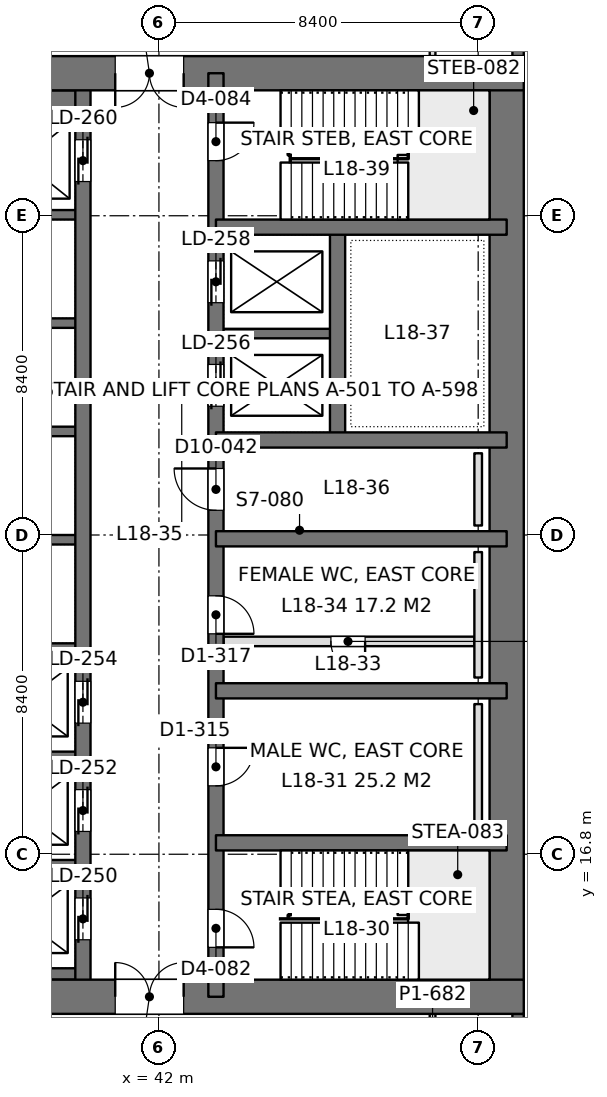
"""IFC4 building model, lengths in metres.
Left out: names, types, materials, properties, quantities, classifications, styles, units other than length and angle.
Written with IfcOpenShell. Run it as: python <this file> out.ifc"""

import sys

from ifc_helpers import new_model, si_unit, direction, frame, frame_2d, origin, place, context, subcontext, project, spatial, rectangle, extrude, element, fill, save


model = new_model("IFC4")
c1 = context("Model", 3, precision=1e-05, world=origin(), true_north=direction((0.0, 1.0)))
c2 = subcontext(c1, "Body", "Model", "MODEL_VIEW")
j1 = project(units=[si_unit("LENGTHUNIT", "METRE"), si_unit("PLANEANGLEUNIT", "RADIAN")], contexts=[c1])
p1 = place(None, origin())
s1 = spatial("IfcSite", under=j1, at=p1, CompositionType="ELEMENT")
p2 = place(p1, origin())
s2 = spatial("IfcBuilding", under=s1, at=p2, CompositionType="ELEMENT")
p3 = place(p2, frame((0.0, 0.0, 81.9)))
s3 = spatial("IfcBuildingStorey", under=s2, at=p3, CompositionType="ELEMENT", Elevation=81.9)
p4 = place(p3, frame((33.6, 13.05, 0.0), z_axis=(0.0, 0.0, 1.0), x_axis=(1.0, 0.0, 0.0)))
e1 = element("IfcWall", 1, at=p4, inside=s3, PredefinedType="SHEAR", context=c2, shape_type="SweptSolid", body=[
    extrude(rectangle(XDim=18.0, YDim=0.9, at=frame_2d((9.0, 0.0))), origin(), (0.0, 0.0, 1.0), 4.5),
])
p5 = place(p4, frame((7.25, 0.0, 0.0)))
e2 = element("IfcOpeningElement", 2, at=p5, cuts=e1, PredefinedType="OPENING", context=c2, shape_type="SweptSolid", body=[
    extrude(rectangle(XDim=1.8, YDim=2.4, at=frame_2d((0.9, 1.2))), frame((0.0, 0.46, 0.0), z_axis=(0.0, -1.0, 0.0), x_axis=(1.0, 0.0, 0.0)), (0.0, 0.0, 1.0), 0.92),
])
p6 = place(p3, frame((33.6, 37.35, 0.0), z_axis=(0.0, 0.0, 1.0), x_axis=(1.0, 0.0, 0.0)))
e3 = element("IfcWall", 3, at=p6, inside=s3, PredefinedType="SHEAR", context=c2, shape_type="SweptSolid", body=[
    extrude(rectangle(XDim=18.0, YDim=0.9, at=frame_2d((9.0, 0.0))), origin(), (0.0, 0.0, 1.0), 4.5),
])
p7 = place(p6, frame((7.25, 0.0, 0.0)))
e4 = element("IfcOpeningElement", 4, at=p7, cuts=e3, PredefinedType="OPENING", context=c2, shape_type="SweptSolid", body=[
    extrude(rectangle(XDim=1.8, YDim=2.4, at=frame_2d((0.9, 1.2))), frame((0.0, 0.46, 0.0), z_axis=(0.0, -1.0, 0.0), x_axis=(1.0, 0.0, 0.0)), (0.0, 0.0, 1.0), 0.92),
])
p8 = place(p3, frame((51.15, 13.05, 0.0), z_axis=(0.0, 0.0, 1.0), x_axis=(0.0, 1.0, 0.0)))
e5 = element("IfcWall", 5, at=p8, inside=s3, PredefinedType="SHEAR", context=c2, shape_type="SweptSolid", body=[
    extrude(rectangle(XDim=24.3, YDim=0.9, at=frame_2d((12.15, 0.0))), origin(), (0.0, 0.0, 1.0), 4.5),
])
p9 = place(p3, frame((43.5, 13.05, 0.0), z_axis=(0.0, 0.0, 1.0), x_axis=(0.0, 1.0, 0.0)))
e6 = element("IfcWall", 6, at=p9, inside=s3, PredefinedType="SHEAR", context=c2, shape_type="SweptSolid", body=[
    extrude(rectangle(XDim=24.3, YDim=0.4, at=frame_2d((12.15, 0.0))), origin(), (0.0, 0.0, 1.0), 4.5),
])
p10 = place(p9, frame((1.3, 0.0, 0.0)))
e7 = element("IfcOpeningElement", 7, at=p10, cuts=e6, PredefinedType="OPENING", context=c2, shape_type="SweptSolid", body=[
    extrude(rectangle(XDim=1.0, YDim=2.2, at=frame_2d((0.5, 1.1))), frame((0.0, 0.21, 0.0), z_axis=(0.0, -1.0, 0.0), x_axis=(1.0, 0.0, 0.0)), (0.0, 0.0, 1.0), 0.42),
])
p11 = place(p9, frame((22.0, 0.0, 0.0)))
e8 = element("IfcOpeningElement", 8, at=p11, cuts=e6, PredefinedType="OPENING", context=c2, shape_type="SweptSolid", body=[
    extrude(rectangle(XDim=1.0, YDim=2.2, at=frame_2d((0.5, 1.1))), frame((0.0, 0.21, 0.0), z_axis=(0.0, -1.0, 0.0), x_axis=(1.0, 0.0, 0.0)), (0.0, 0.0, 1.0), 0.42),
])
p12 = place(p9, frame((5.55, 0.0, 0.0)))
e9 = element("IfcOpeningElement", 9, at=p12, cuts=e6, PredefinedType="OPENING", context=c2, shape_type="SweptSolid", body=[
    extrude(rectangle(XDim=1.0, YDim=2.2, at=frame_2d((0.5, 1.1))), frame((0.0, 0.21, 0.0), z_axis=(0.0, -1.0, 0.0), x_axis=(1.0, 0.0, 0.0)), (0.0, 0.0, 1.0), 0.42),
])
p13 = place(p9, frame((9.55, 0.0, 0.0)))
e10 = element("IfcOpeningElement", 10, at=p13, cuts=e6, PredefinedType="OPENING", context=c2, shape_type="SweptSolid", body=[
    extrude(rectangle(XDim=1.0, YDim=2.2, at=frame_2d((0.5, 1.1))), frame((0.0, 0.21, 0.0), z_axis=(0.0, -1.0, 0.0), x_axis=(1.0, 0.0, 0.0)), (0.0, 0.0, 1.0), 0.42),
])
p14 = place(p9, frame((12.8, 0.0, 0.0)))
e11 = element("IfcOpeningElement", 11, at=p14, cuts=e6, PredefinedType="OPENING", context=c2, shape_type="SweptSolid", body=[
    extrude(rectangle(XDim=1.1, YDim=2.2, at=frame_2d((0.55, 1.1))), frame((0.0, 0.21, 0.0), z_axis=(0.0, -1.0, 0.0), x_axis=(1.0, 0.0, 0.0)), (0.0, 0.0, 1.0), 0.42),
])
p15 = place(p9, frame((15.538, 0.0, 0.0)))
e12 = element("IfcOpeningElement", 12, at=p15, cuts=e6, PredefinedType="OPENING", context=c2, shape_type="SweptSolid", body=[
    extrude(rectangle(XDim=1.1, YDim=2.2, at=frame_2d((0.55, 1.1))), frame((0.0, 0.21, 0.0), z_axis=(0.0, -1.0, 0.0), x_axis=(1.0, 0.0, 0.0)), (0.0, 0.0, 1.0), 0.42),
])
p16 = place(p9, frame((18.262, 0.0, 0.0)))
e13 = element("IfcOpeningElement", 13, at=p16, cuts=e6, PredefinedType="OPENING", context=c2, shape_type="SweptSolid", body=[
    extrude(rectangle(XDim=1.1, YDim=2.2, at=frame_2d((0.55, 1.1))), frame((0.0, 0.21, 0.0), z_axis=(0.0, -1.0, 0.0), x_axis=(1.0, 0.0, 0.0)), (0.0, 0.0, 1.0), 0.42),
])
p17 = place(p3, frame((40.0, 13.05, 0.0), z_axis=(0.0, 0.0, 1.0), x_axis=(0.0, 1.0, 0.0)))
e14 = element("IfcWall", 14, at=p17, inside=s3, PredefinedType="SHEAR", context=c2, shape_type="SweptSolid", body=[
    extrude(rectangle(XDim=24.3, YDim=0.4, at=frame_2d((12.15, 0.0))), origin(), (0.0, 0.0, 1.0), 4.5),
])
p18 = place(p17, frame((1.5, 0.0, 0.0)))
e15 = element("IfcOpeningElement", 15, at=p18, cuts=e14, PredefinedType="OPENING", context=c2, shape_type="SweptSolid", body=[
    extrude(rectangle(XDim=1.1, YDim=2.2, at=frame_2d((0.55, 1.1))), frame((0.0, 0.21, 0.0), z_axis=(0.0, -1.0, 0.0), x_axis=(1.0, 0.0, 0.0)), (0.0, 0.0, 1.0), 0.42),
])
p19 = place(p17, frame((4.35, 0.0, 0.0)))
e16 = element("IfcOpeningElement", 16, at=p19, cuts=e14, PredefinedType="OPENING", context=c2, shape_type="SweptSolid", body=[
    extrude(rectangle(XDim=1.1, YDim=2.2, at=frame_2d((0.55, 1.1))), frame((0.0, 0.21, 0.0), z_axis=(0.0, -1.0, 0.0), x_axis=(1.0, 0.0, 0.0)), (0.0, 0.0, 1.0), 0.42),
])
p20 = place(p17, frame((7.2, 0.0, 0.0)))
e17 = element("IfcOpeningElement", 17, at=p20, cuts=e14, PredefinedType="OPENING", context=c2, shape_type="SweptSolid", body=[
    extrude(rectangle(XDim=1.1, YDim=2.2, at=frame_2d((0.55, 1.1))), frame((0.0, 0.21, 0.0), z_axis=(0.0, -1.0, 0.0), x_axis=(1.0, 0.0, 0.0)), (0.0, 0.0, 1.0), 0.42),
])
p21 = place(p17, frame((21.45, 0.0, 0.0)))
e18 = element("IfcOpeningElement", 18, at=p21, cuts=e14, PredefinedType="OPENING", context=c2, shape_type="SweptSolid", body=[
    extrude(rectangle(XDim=1.1, YDim=2.2, at=frame_2d((0.55, 1.1))), frame((0.0, 0.21, 0.0), z_axis=(0.0, -1.0, 0.0), x_axis=(1.0, 0.0, 0.0)), (0.0, 0.0, 1.0), 0.42),
])
for number, where, z_axis, x_axis in (
    (19, (51.15, 17.1, 0.0), (0.0, 0.0, 1.0), (-1.0, 0.0, 0.0)),
    (20, (51.15, 21.1, 0.0), (0.0, 0.0, 1.0), (-1.0, 0.0, 0.0)),
    (21, (51.15, 25.1, 0.0), (0.0, 0.0, 1.0), (-1.0, 0.0, 0.0)),
    (22, (51.15, 27.7, 0.0), (0.0, 0.0, 1.0), (-1.0, 0.0, 0.0)),
    (23, (51.15, 33.3, 0.0), (0.0, 0.0, 1.0), (-1.0, 0.0, 0.0)),
):
    element("IfcWall", number, at=place(p3, frame(where, z_axis=z_axis, x_axis=x_axis)), inside=s3, PredefinedType="SHEAR", context=c2, shape_type="SweptSolid", body=[
        extrude(rectangle(XDim=7.65, YDim=0.4, at=frame_2d((3.825, 0.0))), origin(), (0.0, 0.0, 1.0), 4.5),
    ])
p22 = place(p3, frame((46.7, 27.7, 0.0), z_axis=(0.0, 0.0, 1.0), x_axis=(0.0, 1.0, 0.0)))
e24 = element("IfcWall", 24, at=p22, inside=s3, PredefinedType="SHEAR", context=c2, shape_type="SweptSolid", body=[
    extrude(rectangle(XDim=5.6, YDim=0.4, at=frame_2d((2.8, 0.0))), origin(), (0.0, 0.0, 1.0), 4.5),
])
p23 = place(p3, frame((46.7, 30.5, 0.0), z_axis=(0.0, 0.0, 1.0), x_axis=(-1.0, 0.0, 0.0)))
e25 = element("IfcWall", 25, at=p23, inside=s3, PredefinedType="SHEAR", context=c2, shape_type="SweptSolid", body=[
    extrude(rectangle(XDim=3.2, YDim=0.25, at=frame_2d((1.6, 0.0))), origin(), (0.0, 0.0, 1.0), 4.5),
])
p24 = place(p3, frame((40.0, 13.65, 0.0), z_axis=(0.0, 0.0, 1.0), x_axis=(-1.0, 0.0, 0.0)))
e26 = element("IfcWall", 26, at=p24, inside=s3, PredefinedType="SHEAR", context=c2, shape_type="SweptSolid", body=[
    extrude(rectangle(XDim=3.2, YDim=0.3, at=frame_2d((1.6, 0.0))), origin(), (0.0, 0.0, 1.0), 4.5),
])
for number, where, z_axis, x_axis in (
    (27, (40.0, 16.525, 0.0), (0.0, 0.0, 1.0), (-1.0, 0.0, 0.0)),
    (28, (40.0, 19.375, 0.0), (0.0, 0.0, 1.0), (-1.0, 0.0, 0.0)),
    (29, (40.0, 22.225, 0.0), (0.0, 0.0, 1.0), (-1.0, 0.0, 0.0)),
    (30, (40.0, 25.075, 0.0), (0.0, 0.0, 1.0), (-1.0, 0.0, 0.0)),
    (31, (40.0, 27.925, 0.0), (0.0, 0.0, 1.0), (-1.0, 0.0, 0.0)),
    (32, (40.0, 30.775, 0.0), (0.0, 0.0, 1.0), (-1.0, 0.0, 0.0)),
    (33, (40.0, 33.625, 0.0), (0.0, 0.0, 1.0), (-1.0, 0.0, 0.0)),
):
    element("IfcWall", number, at=place(p3, frame(where, z_axis=z_axis, x_axis=x_axis)), inside=s3, PredefinedType="SHEAR", context=c2, shape_type="SweptSolid", body=[
        extrude(rectangle(XDim=3.2, YDim=0.25, at=frame_2d((1.6, 0.0))), origin(), (0.0, 0.0, 1.0), 4.5),
    ])
p25 = place(p3, frame((40.0, 36.625, 0.0), z_axis=(0.0, 0.0, 1.0), x_axis=(-1.0, 0.0, 0.0)))
e34 = element("IfcWall", 34, at=p25, inside=s3, PredefinedType="SHEAR", context=c2, shape_type="SweptSolid", body=[
    extrude(rectangle(XDim=3.2, YDim=0.55, at=frame_2d((1.6, 0.0))), origin(), (0.0, 0.0, 1.0), 4.5),
])
p26 = place(p3, frame((51.45, 42.0, 0.0), z_axis=(0.0, 0.0, 1.0), x_axis=(0.0, -1.0, 0.0)))
e35 = element("IfcWall", 35, at=p26, inside=s3, PredefinedType="SOLIDWALL", context=c2, shape_type="SweptSolid", body=[
    extrude(rectangle(XDim=4.2, YDim=0.3, at=frame_2d((2.1, 0.0))), origin(), (0.0, 0.0, 1.0), 4.34),
])
p27 = place(p26, frame((0.9, 0.0, 0.9)))
e36 = element("IfcOpeningElement", 36, at=p27, cuts=e35, PredefinedType="OPENING", context=c2, shape_type="SweptSolid", body=[
    extrude(rectangle(XDim=2.4, YDim=1.9, at=frame_2d((1.2, 0.95))), frame((0.0, 0.16, 0.0), z_axis=(0.0, -1.0, 0.0), x_axis=(1.0, 0.0, 0.0)), (0.0, 0.0, 1.0), 0.32),
])
p28 = place(p3, frame((51.45, 12.6, 0.0), z_axis=(0.0, 0.0, 1.0), x_axis=(0.0, -1.0, 0.0)))
e37 = element("IfcWall", 37, at=p28, inside=s3, PredefinedType="SOLIDWALL", context=c2, shape_type="SweptSolid", body=[
    extrude(rectangle(XDim=4.2, YDim=0.3, at=frame_2d((2.1, 0.0))), origin(), (0.0, 0.0, 1.0), 4.34),
])
p29 = place(p28, frame((0.9, 0.0, 0.9)))
e38 = element("IfcOpeningElement", 38, at=p29, cuts=e37, PredefinedType="OPENING", context=c2, shape_type="SweptSolid", body=[
    extrude(rectangle(XDim=2.4, YDim=1.9, at=frame_2d((1.2, 0.95))), frame((0.0, 0.16, 0.0), z_axis=(0.0, -1.0, 0.0), x_axis=(1.0, 0.0, 0.0)), (0.0, 0.0, 1.0), 0.32),
])
p30 = place(p3, frame((49.2, 10.4, 0.0), z_axis=(0.0, 0.0, 1.0), x_axis=(0.0, 1.0, 0.0)))
e39 = element("IfcWall", 39, at=p30, inside=s3, PredefinedType="PARTITIONING", context=c2, shape_type="SweptSolid", body=[
    extrude(rectangle(XDim=2.202, YDim=0.15, at=frame_2d((1.101, 0.0))), origin(), (0.0, 0.0, 1.0), 4.34),
])
p31 = place(p3, frame((49.2, 37.8, 0.0), z_axis=(0.0, 0.0, 1.0), x_axis=(0.0, 1.0, 0.0)))
e40 = element("IfcWall", 40, at=p31, inside=s3, PredefinedType="PARTITIONING", context=c2, shape_type="SweptSolid", body=[
    extrude(rectangle(XDim=2.2, YDim=0.15, at=frame_2d((1.1, 0.0))), origin(), (0.0, 0.0, 1.0), 4.34),
])
p32 = place(p3, frame((43.7, 22.4, 0.0), z_axis=(0.0, 0.0, 1.0), x_axis=(1.0, 0.0, 0.0)))
e41 = element("IfcWall", 41, at=p32, inside=s3, PredefinedType="PARTITIONING", context=c2, shape_type="SweptSolid", body=[
    extrude(rectangle(XDim=6.6, YDim=0.25, at=frame_2d((3.3, 0.0))), origin(), (0.0, 0.0, 1.0), 4.3),
])
p33 = place(p32, frame((2.825, 0.0, 0.0)))
e42 = element("IfcOpeningElement", 42, at=p33, cuts=e41, PredefinedType="OPENING", context=c2, shape_type="SweptSolid", body=[
    extrude(rectangle(XDim=0.9, YDim=2.2, at=frame_2d((0.45, 1.1))), frame((0.0, 0.135, 0.0), z_axis=(0.0, -1.0, 0.0), x_axis=(1.0, 0.0, 0.0)), (0.0, 0.0, 1.0), 0.27),
])
for number, where, z_axis, x_axis in (
    (43, (50.4, 17.45, 0.0), (0.0, 0.0, 1.0), (0.0, 1.0, 0.0)),
    (44, (50.4, 21.45, 0.0), (0.0, 0.0, 1.0), (0.0, 1.0, 0.0)),
):
    element("IfcWall", number, at=place(p3, frame(where, z_axis=z_axis, x_axis=x_axis)), inside=s3, PredefinedType="PLUMBINGWALL", context=c2, shape_type="SweptSolid", body=[
        extrude(rectangle(XDim=3.3, YDim=0.2, at=frame_2d((1.65, 0.0))), origin(), (0.0, 0.0, 1.0), 1.2),
    ])
p34 = place(p3, frame((50.4, 25.45, 0.0), z_axis=(0.0, 0.0, 1.0), x_axis=(0.0, 1.0, 0.0)))
e45 = element("IfcWall", 45, at=p34, inside=s3, PredefinedType="PLUMBINGWALL", context=c2, shape_type="SweptSolid", body=[
    extrude(rectangle(XDim=1.9, YDim=0.2, at=frame_2d((0.95, 0.0))), origin(), (0.0, 0.0, 1.0), 1.2),
])
p35 = place(p5, origin())
e46 = element("IfcDoor", 46, at=p35, inside=s3, OperationType="DOUBLE_DOOR_SINGLE_SWING", PredefinedType="DOOR", context=c2, shape_type="SweptSolid", body=[
    extrude(rectangle(XDim=1.8, YDim=2.4, at=frame_2d((0.9, 1.2))), frame((0.0, 0.025, 0.0), z_axis=(0.0, -1.0, 0.0), x_axis=(1.0, 0.0, 0.0)), (0.0, 0.0, 1.0), 0.05),
])
fill(e2, e46)
p36 = place(p7, frame((1.8, 0.0, 0.0), z_axis=(0.0, 0.0, 1.0), x_axis=(-1.0, 0.0, 0.0)))
e47 = element("IfcDoor", 47, at=p36, inside=s3, OperationType="DOUBLE_DOOR_SINGLE_SWING", PredefinedType="DOOR", context=c2, shape_type="SweptSolid", body=[
    extrude(rectangle(XDim=1.8, YDim=2.4, at=frame_2d((0.9, 1.2))), frame((0.0, 0.025, 0.0), z_axis=(0.0, -1.0, 0.0), x_axis=(1.0, 0.0, 0.0)), (0.0, 0.0, 1.0), 0.05),
])
fill(e4, e47)
p37 = place(p10, frame((1.0, 0.0, 0.0), z_axis=(0.0, 0.0, 1.0), x_axis=(-1.0, 0.0, 0.0)))
e48 = element("IfcDoor", 48, at=p37, inside=s3, OperationType="SINGLE_SWING_RIGHT", PredefinedType="DOOR", context=c2, shape_type="SweptSolid", body=[
    extrude(rectangle(XDim=1.0, YDim=2.2, at=frame_2d((0.5, 1.1))), frame((0.0, 0.025, 0.0), z_axis=(0.0, -1.0, 0.0), x_axis=(1.0, 0.0, 0.0)), (0.0, 0.0, 1.0), 0.05),
])
fill(e7, e48)
p38 = place(p11, frame((1.0, 0.0, 0.0), z_axis=(0.0, 0.0, 1.0), x_axis=(-1.0, 0.0, 0.0)))
e49 = element("IfcDoor", 49, at=p38, inside=s3, OperationType="SINGLE_SWING_LEFT", PredefinedType="DOOR", context=c2, shape_type="SweptSolid", body=[
    extrude(rectangle(XDim=1.0, YDim=2.2, at=frame_2d((0.5, 1.1))), frame((0.0, 0.025, 0.0), z_axis=(0.0, -1.0, 0.0), x_axis=(1.0, 0.0, 0.0)), (0.0, 0.0, 1.0), 0.05),
])
fill(e8, e49)
p39 = place(p12, frame((1.0, 0.0, 0.0), z_axis=(0.0, 0.0, 1.0), x_axis=(-1.0, 0.0, 0.0)))
e50 = element("IfcDoor", 50, at=p39, inside=s3, OperationType="SINGLE_SWING_LEFT", PredefinedType="DOOR", context=c2, shape_type="SweptSolid", body=[
    extrude(rectangle(XDim=1.0, YDim=2.2, at=frame_2d((0.5, 1.1))), frame((0.0, 0.025, 0.0), z_axis=(0.0, -1.0, 0.0), x_axis=(1.0, 0.0, 0.0)), (0.0, 0.0, 1.0), 0.05),
])
fill(e9, e50)
p40 = place(p13, frame((1.0, 0.0, 0.0), z_axis=(0.0, 0.0, 1.0), x_axis=(-1.0, 0.0, 0.0)))
e51 = element("IfcDoor", 51, at=p40, inside=s3, OperationType="SINGLE_SWING_RIGHT", PredefinedType="DOOR", context=c2, shape_type="SweptSolid", body=[
    extrude(rectangle(XDim=1.0, YDim=2.2, at=frame_2d((0.5, 1.1))), frame((0.0, 0.025, 0.0), z_axis=(0.0, -1.0, 0.0), x_axis=(1.0, 0.0, 0.0)), (0.0, 0.0, 1.0), 0.05),
])
fill(e10, e51)
p41 = place(p14, origin())
e52 = element("IfcDoor", 52, at=p41, inside=s3, OperationType="SINGLE_SWING_RIGHT", PredefinedType="DOOR", context=c2, shape_type="SweptSolid", body=[
    extrude(rectangle(XDim=1.1, YDim=2.2, at=frame_2d((0.55, 1.1))), frame((0.0, 0.025, 0.0), z_axis=(0.0, -1.0, 0.0), x_axis=(1.0, 0.0, 0.0)), (0.0, 0.0, 1.0), 0.05),
])
fill(e11, e52)
p42 = place(p18, origin())
e53 = element("IfcDoor", 53, at=p42, inside=s3, OperationType="DOUBLE_DOOR_SLIDING", PredefinedType="DOOR", context=c2, shape_type="SweptSolid", body=[
    extrude(rectangle(XDim=1.1, YDim=2.2, at=frame_2d((0.55, 1.1))), frame((0.0, 0.025, 0.0), z_axis=(0.0, -1.0, 0.0), x_axis=(1.0, 0.0, 0.0)), (0.0, 0.0, 1.0), 0.05),
])
fill(e15, e53)
p43 = place(p19, origin())
e54 = element("IfcDoor", 54, at=p43, inside=s3, OperationType="DOUBLE_DOOR_SLIDING", PredefinedType="DOOR", context=c2, shape_type="SweptSolid", body=[
    extrude(rectangle(XDim=1.1, YDim=2.2, at=frame_2d((0.55, 1.1))), frame((0.0, 0.025, 0.0), z_axis=(0.0, -1.0, 0.0), x_axis=(1.0, 0.0, 0.0)), (0.0, 0.0, 1.0), 0.05),
])
fill(e16, e54)
p44 = place(p20, origin())
e55 = element("IfcDoor", 55, at=p44, inside=s3, OperationType="DOUBLE_DOOR_SLIDING", PredefinedType="DOOR", context=c2, shape_type="SweptSolid", body=[
    extrude(rectangle(XDim=1.1, YDim=2.2, at=frame_2d((0.55, 1.1))), frame((0.0, 0.025, 0.0), z_axis=(0.0, -1.0, 0.0), x_axis=(1.0, 0.0, 0.0)), (0.0, 0.0, 1.0), 0.05),
])
fill(e17, e55)
p45 = place(p21, origin())
e56 = element("IfcDoor", 56, at=p45, inside=s3, OperationType="DOUBLE_DOOR_SLIDING", PredefinedType="DOOR", context=c2, shape_type="SweptSolid", body=[
    extrude(rectangle(XDim=1.1, YDim=2.2, at=frame_2d((0.55, 1.1))), frame((0.0, 0.025, 0.0), z_axis=(0.0, -1.0, 0.0), x_axis=(1.0, 0.0, 0.0)), (0.0, 0.0, 1.0), 0.05),
])
fill(e18, e56)
p46 = place(p15, origin())
e57 = element("IfcDoor", 57, at=p46, inside=s3, OperationType="DOUBLE_DOOR_SLIDING", PredefinedType="DOOR", context=c2, shape_type="SweptSolid", body=[
    extrude(rectangle(XDim=1.1, YDim=2.2, at=frame_2d((0.55, 1.1))), frame((0.0, 0.025, 0.0), z_axis=(0.0, -1.0, 0.0), x_axis=(1.0, 0.0, 0.0)), (0.0, 0.0, 1.0), 0.05),
])
fill(e12, e57)
p47 = place(p16, origin())
e58 = element("IfcDoor", 58, at=p47, inside=s3, OperationType="DOUBLE_DOOR_SLIDING", PredefinedType="DOOR", context=c2, shape_type="SweptSolid", body=[
    extrude(rectangle(XDim=1.1, YDim=2.2, at=frame_2d((0.55, 1.1))), frame((0.0, 0.025, 0.0), z_axis=(0.0, -1.0, 0.0), x_axis=(1.0, 0.0, 0.0)), (0.0, 0.0, 1.0), 0.05),
])
fill(e13, e58)
p48 = place(p33, frame((0.9, 0.0, 0.0), z_axis=(0.0, 0.0, 1.0), x_axis=(-1.0, 0.0, 0.0)))
e59 = element("IfcDoor", 59, at=p48, inside=s3, OperationType="SINGLE_SWING_LEFT", PredefinedType="DOOR", context=c2, shape_type="SweptSolid", body=[
    extrude(rectangle(XDim=0.9, YDim=2.2, at=frame_2d((0.45, 1.1))), frame((0.0, 0.025, 0.0), z_axis=(0.0, -1.0, 0.0), x_axis=(1.0, 0.0, 0.0)), (0.0, 0.0, 1.0), 0.05),
])
fill(e42, e59)
save(model, sys.argv[1])
